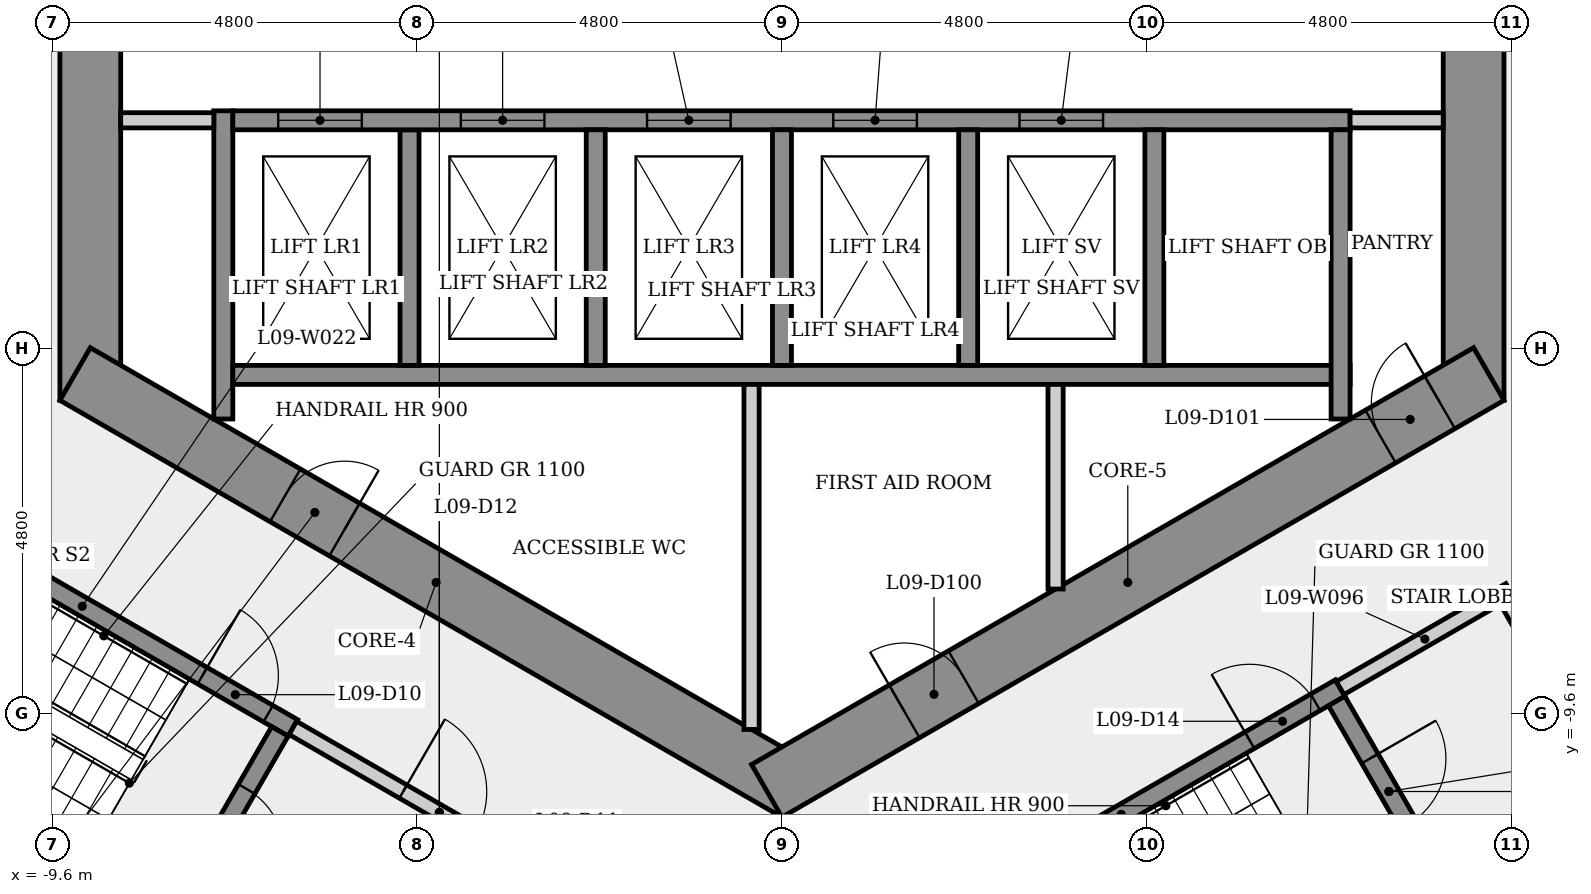
"""IFC4 building model, lengths in metres.
Left out: names, types, materials, properties, quantities, classifications, styles, units other than length and angle.
Written with IfcOpenShell. Run it as: python <this file> out.ifc"""

import sys

from ifc_helpers import new_model, si_unit, direction, frame, frame_2d, origin, place, context, subcontext, project, spatial, rectangle, extrude, element, fill, save


model = new_model("IFC4")
c1 = context("Model", 3, precision=1e-05, world=origin(), true_north=direction((0.0, 1.0)))
c2 = subcontext(c1, "Body", "Model", "MODEL_VIEW")
j1 = project(units=[si_unit("LENGTHUNIT", "METRE"), si_unit("PLANEANGLEUNIT", "RADIAN")], contexts=[c1])
p1 = place(None, origin())
s1 = spatial("IfcSite", under=j1, at=p1, CompositionType="ELEMENT")
p2 = place(p1, origin())
s2 = spatial("IfcBuilding", under=s1, at=p2, CompositionType="ELEMENT")
p3 = place(p2, frame((0.0, 0.0, 39.1)))
s3 = spatial("IfcBuildingStorey", under=s2, at=p3, CompositionType="ELEMENT", Elevation=39.1)
p4 = place(p3, frame((9.1, -5.485, 0.0), z_axis=(0.0, 0.0, 1.0), x_axis=(0.0, 1.0, 0.0)))
e1 = element("IfcWall", 1, at=p4, inside=s3, PredefinedType="SHEAR", context=c2, shape_type="SweptSolid", body=[
    extrude(rectangle(XDim=10.97, YDim=0.8, at=frame_2d((5.485, 0.0))), origin(), (0.0, 0.0, 1.0), 3.4),
])
p5 = place(p4, frame((4.685, 0.0, 0.0)))
e2 = element("IfcOpeningElement", 2, at=p5, cuts=e1, PredefinedType="OPENING", context=c2, shape_type="SweptSolid", body=[
    extrude(rectangle(XDim=1.6, YDim=2.1, at=frame_2d((0.8, 1.05))), frame((0.0, 0.41, 0.0), z_axis=(0.0, -1.0, 0.0), x_axis=(1.0, 0.0, 0.0)), (0.0, 0.0, 1.0), 0.82),
])
p6 = place(p3, frame((-9.1, 5.485, 0.0), z_axis=(0.0, 0.0, 1.0), x_axis=(0.0, -1.0, 0.0)))
e3 = element("IfcWall", 3, at=p6, inside=s3, PredefinedType="SHEAR", context=c2, shape_type="SweptSolid", body=[
    extrude(rectangle(XDim=10.97, YDim=0.8, at=frame_2d((5.485, 0.0))), origin(), (0.0, 0.0, 1.0), 3.4),
])
p7 = place(p6, frame((4.685, 0.0, 0.0)))
e4 = element("IfcOpeningElement", 4, at=p7, cuts=e3, PredefinedType="OPENING", context=c2, shape_type="SweptSolid", body=[
    extrude(rectangle(XDim=1.6, YDim=2.1, at=frame_2d((0.8, 1.05))), frame((0.0, 0.41, 0.0), z_axis=(0.0, -1.0, 0.0), x_axis=(1.0, 0.0, 0.0)), (0.0, 0.0, 1.0), 0.82),
])
p8 = place(p3, frame((-9.3, -5.138, 0.0), z_axis=(0.0, 0.0, 1.0), x_axis=(0.866023993627, -0.500002442456, 0.0)))
e5 = element("IfcWall", 5, at=p8, inside=s3, PredefinedType="SHEAR", context=c2, shape_type="SweptSolid", body=[
    extrude(rectangle(XDim=10.97, YDim=0.8, at=frame_2d((5.485, 0.0))), origin(), (0.0, 0.0, 1.0), 3.4),
])
p9 = place(p8, frame((3.192, 0.0, 0.0)))
e6 = element("IfcOpeningElement", 6, at=p9, cuts=e5, PredefinedType="OPENING", context=c2, shape_type="SweptSolid", body=[
    extrude(rectangle(XDim=0.9, YDim=2.1, at=frame_2d((0.45, 1.05))), frame((0.0, 0.41, 0.0), z_axis=(0.0, -1.0, 0.0), x_axis=(1.0, 0.0, 0.0)), (0.0, 0.0, 1.0), 0.82),
])
p10 = place(p3, frame((-0.2, -10.623, 0.0), z_axis=(0.0, 0.0, 1.0), x_axis=(0.866023993627, 0.500002442456, 0.0)))
e7 = element("IfcWall", 7, at=p10, inside=s3, PredefinedType="SHEAR", context=c2, shape_type="SweptSolid", body=[
    extrude(rectangle(XDim=10.97, YDim=0.8, at=frame_2d((5.485, 0.0))), origin(), (0.0, 0.0, 1.0), 3.4),
])
p11 = place(p10, frame((2.091, 0.0, 0.0)))
e8 = element("IfcOpeningElement", 8, at=p11, cuts=e7, PredefinedType="OPENING", context=c2, shape_type="SweptSolid", body=[
    extrude(rectangle(XDim=0.9, YDim=2.1, at=frame_2d((0.45, 1.05))), frame((0.0, 0.41, 0.0), z_axis=(0.0, -1.0, 0.0), x_axis=(1.0, 0.0, 0.0)), (0.0, 0.0, 1.0), 0.82),
])
p12 = place(p10, frame((9.325, 0.0, 0.0)))
e9 = element("IfcOpeningElement", 9, at=p12, cuts=e7, PredefinedType="OPENING", context=c2, shape_type="SweptSolid", body=[
    extrude(rectangle(XDim=0.9, YDim=2.1, at=frame_2d((0.45, 1.05))), frame((0.0, 0.41, 0.0), z_axis=(0.0, -1.0, 0.0), x_axis=(1.0, 0.0, 0.0)), (0.0, 0.0, 1.0), 0.82),
])
p13 = place(p3, frame((-11.977, -6.595, 0.0), z_axis=(0.0, 0.0, 1.0), x_axis=(0.866025499775, -0.499999833739, 0.0)))
e10 = element("IfcWall", 10, at=p13, inside=s3, PredefinedType="SHEAR", context=c2, shape_type="SweptSolid", body=[
    extrude(rectangle(XDim=6.4, YDim=0.25, at=frame_2d((3.2, 0.0))), origin(), (0.0, 0.0, 1.0), 3.05),
])
p14 = place(p13, frame((5.025, 0.0, 0.0)))
e11 = element("IfcOpeningElement", 11, at=p14, cuts=e10, PredefinedType="OPENING", context=c2, shape_type="SweptSolid", body=[
    extrude(rectangle(XDim=1.0, YDim=2.1, at=frame_2d((0.5, 1.05))), frame((0.0, 0.135, 0.0), z_axis=(0.0, -1.0, 0.0), x_axis=(1.0, 0.0, 0.0)), (0.0, 0.0, 1.0), 0.27),
])
p15 = place(p3, frame((-13.477, -9.193, 0.0), z_axis=(0.0, 0.0, 1.0), x_axis=(0.866025499775, -0.499999833739, 0.0)))
e12 = element("IfcWall", 12, at=p15, inside=s3, PredefinedType="SHEAR", context=c2, shape_type="SweptSolid", body=[
    extrude(rectangle(XDim=6.4, YDim=0.25, at=frame_2d((3.2, 0.0))), origin(), (0.0, 0.0, 1.0), 3.05),
])
p16 = place(p3, frame((-7.35, -5.73, 0.0), z_axis=(0.0, 0.0, 1.0), x_axis=(0.0, 1.0, 0.0)))
e13 = element("IfcWall", 13, at=p16, inside=s3, PredefinedType="SHEAR", context=c2, shape_type="SweptSolid", body=[
    extrude(rectangle(XDim=4.055, YDim=0.25, at=frame_2d((2.028, 0.0))), origin(), (0.0, 0.0, 1.0), 3.05),
])
p17 = place(p3, frame((-7.475, -1.8, 0.0), z_axis=(0.0, 0.0, 1.0), x_axis=(-1.0, 0.0, 0.0)))
e14 = element("IfcWall", 14, at=p17, inside=s3, PredefinedType="PARTITIONING", context=c2, shape_type="SweptSolid", body=[
    extrude(rectangle(XDim=1.225, YDim=0.2, at=frame_2d((0.613, 0.0))), origin(), (0.0, 0.0, 1.0), 3.05),
])
p18 = place(p3, frame((-6.605, -9.841, 0.0), z_axis=(0.0, 0.0, 1.0), x_axis=(-0.499996545922, -0.866027397988, 0.0)))
e15 = element("IfcWall", 15, at=p18, inside=s3, PredefinedType="SHEAR", context=c2, shape_type="SweptSolid", body=[
    extrude(rectangle(XDim=2.75, YDim=0.25, at=frame_2d((1.375, 0.0))), origin(), (0.0, 0.0, 1.0), 3.05),
])
p19 = place(p18, frame((0.875, 0.0, 0.0)))
e16 = element("IfcOpeningElement", 16, at=p19, cuts=e15, PredefinedType="OPENING", context=c2, shape_type="SweptSolid", body=[
    extrude(rectangle(XDim=1.0, YDim=2.1, at=frame_2d((0.5, 1.05))), frame((0.0, 0.135, 0.0), z_axis=(0.0, -1.0, 0.0), x_axis=(1.0, 0.0, 0.0)), (0.0, 0.0, 1.0), 0.27),
])
p20 = place(p3, frame((-6.435, -9.795, 0.0), z_axis=(0.0, 0.0, 1.0), x_axis=(0.866012907634, -0.500021643343, 0.0)))
e17 = element("IfcWall", 17, at=p20, inside=s3, PredefinedType="PARTITIONING", context=c2, shape_type="SweptSolid", body=[
    extrude(rectangle(XDim=4.45, YDim=0.2, at=frame_2d((2.225, 0.0))), origin(), (0.0, 0.0, 1.0), 3.05),
])
p21 = place(p20, frame((1.675, 0.0, 0.0)))
e18 = element("IfcOpeningElement", 18, at=p21, cuts=e17, PredefinedType="OPENING", context=c2, shape_type="SweptSolid", body=[
    extrude(rectangle(XDim=1.1, YDim=2.1, at=frame_2d((0.55, 1.05))), frame((0.0, 0.11, 0.0), z_axis=(0.0, -1.0, 0.0), x_axis=(1.0, 0.0, 0.0)), (0.0, 0.0, 1.0), 0.22),
])
p22 = place(p3, frame((-7.225, -5.15, 0.0), z_axis=(0.0, 0.0, 1.0), x_axis=(1.0, 0.0, 0.0)))
e19 = element("IfcWall", 19, at=p22, inside=s3, PredefinedType="SHEAR", context=c2, shape_type="SweptSolid", body=[
    extrude(rectangle(XDim=14.7, YDim=0.25, at=frame_2d((7.35, 0.0))), origin(), (0.0, 0.0, 1.0), 3.05),
])
p23 = place(p3, frame((-4.9, -1.925, 0.0), z_axis=(0.0, 0.0, 1.0), x_axis=(0.0, -1.0, 0.0)))
e20 = element("IfcWall", 20, at=p23, inside=s3, PredefinedType="SHEAR", context=c2, shape_type="SweptSolid", body=[
    extrude(rectangle(XDim=3.1, YDim=0.25, at=frame_2d((1.55, 0.0))), origin(), (0.0, 0.0, 1.0), 3.4),
])
p24 = place(p3, frame((-7.225, -1.8, 0.0), z_axis=(0.0, 0.0, 1.0), x_axis=(1.0, 0.0, 0.0)))
e21 = element("IfcWall", 21, at=p24, inside=s3, PredefinedType="SHEAR", context=c2, shape_type="SweptSolid", body=[
    extrude(rectangle(XDim=14.7, YDim=0.25, at=frame_2d((7.35, 0.0))), origin(), (0.0, 0.0, 1.0), 3.05),
])
p25 = place(p24, frame((0.597, 0.0, 0.0)))
e22 = element("IfcOpeningElement", 22, at=p25, cuts=e21, PredefinedType="OPENING", context=c2, shape_type="SweptSolid", body=[
    extrude(rectangle(XDim=1.1, YDim=2.1, at=frame_2d((0.55, 1.05))), frame((0.0, 0.135, 0.0), z_axis=(0.0, -1.0, 0.0), x_axis=(1.0, 0.0, 0.0)), (0.0, 0.0, 1.0), 0.27),
])
p26 = place(p24, frame((3.0, 0.0, 0.0)))
e23 = element("IfcOpeningElement", 23, at=p26, cuts=e21, PredefinedType="OPENING", context=c2, shape_type="SweptSolid", body=[
    extrude(rectangle(XDim=1.1, YDim=2.1, at=frame_2d((0.55, 1.05))), frame((0.0, 0.135, 0.0), z_axis=(0.0, -1.0, 0.0), x_axis=(1.0, 0.0, 0.0)), (0.0, 0.0, 1.0), 0.27),
])
p27 = place(p24, frame((5.45, 0.0, 0.0)))
e24 = element("IfcOpeningElement", 24, at=p27, cuts=e21, PredefinedType="OPENING", context=c2, shape_type="SweptSolid", body=[
    extrude(rectangle(XDim=1.1, YDim=2.1, at=frame_2d((0.55, 1.05))), frame((0.0, 0.135, 0.0), z_axis=(0.0, -1.0, 0.0), x_axis=(1.0, 0.0, 0.0)), (0.0, 0.0, 1.0), 0.27),
])
p28 = place(p24, frame((7.9, 0.0, 0.0)))
e25 = element("IfcOpeningElement", 25, at=p28, cuts=e21, PredefinedType="OPENING", context=c2, shape_type="SweptSolid", body=[
    extrude(rectangle(XDim=1.1, YDim=2.1, at=frame_2d((0.55, 1.05))), frame((0.0, 0.135, 0.0), z_axis=(0.0, -1.0, 0.0), x_axis=(1.0, 0.0, 0.0)), (0.0, 0.0, 1.0), 0.27),
])
p29 = place(p24, frame((10.35, 0.0, 0.0)))
e26 = element("IfcOpeningElement", 26, at=p29, cuts=e21, PredefinedType="OPENING", context=c2, shape_type="SweptSolid", body=[
    extrude(rectangle(XDim=1.1, YDim=2.1, at=frame_2d((0.55, 1.05))), frame((0.0, 0.135, 0.0), z_axis=(0.0, -1.0, 0.0), x_axis=(1.0, 0.0, 0.0)), (0.0, 0.0, 1.0), 0.27),
])
p30 = place(p3, frame((-2.45, -1.925, 0.0), z_axis=(0.0, 0.0, 1.0), x_axis=(0.0, -1.0, 0.0)))
e27 = element("IfcWall", 27, at=p30, inside=s3, PredefinedType="SHEAR", context=c2, shape_type="SweptSolid", body=[
    extrude(rectangle(XDim=3.1, YDim=0.25, at=frame_2d((1.55, 0.0))), origin(), (0.0, 0.0, 1.0), 3.4),
])
p31 = place(p3, frame((-0.4, -5.275, 0.0), z_axis=(0.0, 0.0, 1.0), x_axis=(0.0, -1.0, 0.0)))
e28 = element("IfcWall", 28, at=p31, inside=s3, PredefinedType="PARTITIONING", context=c2, shape_type="SweptSolid", body=[
    extrude(rectangle(XDim=4.54, YDim=0.2, at=frame_2d((2.27, 0.0))), origin(), (0.0, 0.0, 1.0), 3.05),
])
p32 = place(p3, frame((0.0, -1.925, 0.0), z_axis=(0.0, 0.0, 1.0), x_axis=(0.0, -1.0, 0.0)))
e29 = element("IfcWall", 29, at=p32, inside=s3, PredefinedType="SHEAR", context=c2, shape_type="SweptSolid", body=[
    extrude(rectangle(XDim=3.1, YDim=0.25, at=frame_2d((1.55, 0.0))), origin(), (0.0, 0.0, 1.0), 3.4),
])
p33 = place(p3, frame((1.585, -12.595, 0.0), z_axis=(0.0, 0.0, 1.0), x_axis=(0.866036417653, 0.499980922934, 0.0)))
e30 = element("IfcWall", 30, at=p33, inside=s3, PredefinedType="SHEAR", context=c2, shape_type="SweptSolid", body=[
    extrude(rectangle(XDim=6.65, YDim=0.25, at=frame_2d((3.325, 0.0))), origin(), (0.0, 0.0, 1.0), 3.05),
])
p34 = place(p33, frame((5.275, 0.0, 0.0)))
e31 = element("IfcOpeningElement", 31, at=p34, cuts=e30, PredefinedType="OPENING", context=c2, shape_type="SweptSolid", body=[
    extrude(rectangle(XDim=1.0, YDim=2.1, at=frame_2d((0.5, 1.05))), frame((0.0, 0.135, 0.0), z_axis=(0.0, -1.0, 0.0), x_axis=(1.0, 0.0, 0.0)), (0.0, 0.0, 1.0), 0.27),
])
p35 = place(p3, frame((2.45, -1.925, 0.0), z_axis=(0.0, 0.0, 1.0), x_axis=(0.0, -1.0, 0.0)))
e32 = element("IfcWall", 32, at=p35, inside=s3, PredefinedType="SHEAR", context=c2, shape_type="SweptSolid", body=[
    extrude(rectangle(XDim=3.1, YDim=0.25, at=frame_2d((1.55, 0.0))), origin(), (0.0, 0.0, 1.0), 3.4),
])
p36 = place(p3, frame((3.6, -5.275, 0.0), z_axis=(0.0, 0.0, 1.0), x_axis=(0.0, -1.0, 0.0)))
e33 = element("IfcWall", 33, at=p36, inside=s3, PredefinedType="PARTITIONING", context=c2, shape_type="SweptSolid", body=[
    extrude(rectangle(XDim=2.692, YDim=0.2, at=frame_2d((1.346, 0.0))), origin(), (0.0, 0.0, 1.0), 3.05),
])
p37 = place(p3, frame((4.9, -1.925, 0.0), z_axis=(0.0, 0.0, 1.0), x_axis=(0.0, -1.0, 0.0)))
e34 = element("IfcWall", 34, at=p37, inside=s3, PredefinedType="SHEAR", context=c2, shape_type="SweptSolid", body=[
    extrude(rectangle(XDim=3.1, YDim=0.25, at=frame_2d((1.55, 0.0))), origin(), (0.0, 0.0, 1.0), 3.4),
])
p38 = place(p3, frame((7.298, -9.441, 0.0), z_axis=(0.0, 0.0, 1.0), x_axis=(0.500034990121, -0.866005201286, 0.0)))
e35 = element("IfcWall", 35, at=p38, inside=s3, PredefinedType="SHEAR", context=c2, shape_type="SweptSolid", body=[
    extrude(rectangle(XDim=2.75, YDim=0.25, at=frame_2d((1.375, 0.0))), origin(), (0.0, 0.0, 1.0), 3.05),
])
p39 = place(p38, frame((0.875, 0.0, 0.0)))
e36 = element("IfcOpeningElement", 36, at=p39, cuts=e35, PredefinedType="OPENING", context=c2, shape_type="SweptSolid", body=[
    extrude(rectangle(XDim=1.0, YDim=2.1, at=frame_2d((0.5, 1.05))), frame((0.0, 0.135, 0.0), z_axis=(0.0, -1.0, 0.0), x_axis=(1.0, 0.0, 0.0)), (0.0, 0.0, 1.0), 0.27),
])
p40 = place(p3, frame((7.344, -9.27, 0.0), z_axis=(0.0, 0.0, 1.0), x_axis=(0.866005588531, 0.500034319456, 0.0)))
e37 = element("IfcWall", 37, at=p40, inside=s3, PredefinedType="PARTITIONING", context=c2, shape_type="SweptSolid", body=[
    extrude(rectangle(XDim=2.575, YDim=0.2, at=frame_2d((1.288, 0.0))), origin(), (0.0, 0.0, 1.0), 3.05),
])
p41 = place(p3, frame((7.35, -1.925, 0.0), z_axis=(0.0, 0.0, 1.0), x_axis=(0.0, -1.0, 0.0)))
e38 = element("IfcWall", 38, at=p41, inside=s3, PredefinedType="SHEAR", context=c2, shape_type="SweptSolid", body=[
    extrude(rectangle(XDim=3.805, YDim=0.25, at=frame_2d((1.903, 0.0))), origin(), (0.0, 0.0, 1.0), 3.05),
])
p42 = place(p3, frame((8.7, -1.8, 0.0), z_axis=(0.0, 0.0, 1.0), x_axis=(-1.0, 0.0, 0.0)))
e39 = element("IfcWall", 39, at=p42, inside=s3, PredefinedType="PARTITIONING", context=c2, shape_type="SweptSolid", body=[
    extrude(rectangle(XDim=1.225, YDim=0.2, at=frame_2d((0.613, 0.0))), origin(), (0.0, 0.0, 1.0), 3.05),
])
p43 = place(p3, frame((9.537, -8.119, 0.0), z_axis=(0.0, 0.0, 1.0), x_axis=(0.499990139034, -0.866031096941, 0.0)))
e40 = element("IfcWall", 40, at=p43, inside=s3, PredefinedType="PARTITIONING", context=c2, shape_type="SweptSolid", body=[
    extrude(rectangle(XDim=3.0, YDim=0.2, at=frame_2d((1.5, 0.0))), origin(), (0.0, 0.0, 1.0), 3.05),
])
p44 = place(p43, frame((0.935, 0.0, 0.0)))
e41 = element("IfcOpeningElement", 41, at=p44, cuts=e40, PredefinedType="OPENING", context=c2, shape_type="SweptSolid", body=[
    extrude(rectangle(XDim=1.0, YDim=2.1, at=frame_2d((0.5, 1.05))), frame((0.0, 0.11, 0.0), z_axis=(0.0, -1.0, 0.0), x_axis=(1.0, 0.0, 0.0)), (0.0, 0.0, 1.0), 0.22),
])
p45 = place(p3, frame((10.901, -10.681, 0.0), z_axis=(0.0, 0.0, 1.0), x_axis=(-0.866009402589, -0.500027713859, 0.0)))
e42 = element("IfcWall", 42, at=p45, inside=s3, PredefinedType="PARTITIONING", context=c2, shape_type="SweptSolid", body=[
    extrude(rectangle(XDim=2.1, YDim=0.2, at=frame_2d((1.05, 0.0))), origin(), (0.0, 0.0, 1.0), 3.05),
])
p46 = place(p25, origin())
e43 = element("IfcDoor", 43, at=p46, inside=s3, OperationType="SLIDING_TO_LEFT", PredefinedType="DOOR", context=c2, shape_type="SweptSolid", body=[
    extrude(rectangle(XDim=1.1, YDim=2.1, at=frame_2d((0.55, 1.05))), frame((0.0, 0.025, 0.0), z_axis=(0.0, -1.0, 0.0), x_axis=(1.0, 0.0, 0.0)), (0.0, 0.0, 1.0), 0.05),
])
fill(e22, e43)
p47 = place(p26, origin())
e44 = element("IfcDoor", 44, at=p47, inside=s3, OperationType="SLIDING_TO_LEFT", PredefinedType="DOOR", context=c2, shape_type="SweptSolid", body=[
    extrude(rectangle(XDim=1.1, YDim=2.1, at=frame_2d((0.55, 1.05))), frame((0.0, 0.025, 0.0), z_axis=(0.0, -1.0, 0.0), x_axis=(1.0, 0.0, 0.0)), (0.0, 0.0, 1.0), 0.05),
])
fill(e23, e44)
p48 = place(p27, origin())
e45 = element("IfcDoor", 45, at=p48, inside=s3, OperationType="SLIDING_TO_LEFT", PredefinedType="DOOR", context=c2, shape_type="SweptSolid", body=[
    extrude(rectangle(XDim=1.1, YDim=2.1, at=frame_2d((0.55, 1.05))), frame((0.0, 0.025, 0.0), z_axis=(0.0, -1.0, 0.0), x_axis=(1.0, 0.0, 0.0)), (0.0, 0.0, 1.0), 0.05),
])
fill(e24, e45)
p49 = place(p28, origin())
e46 = element("IfcDoor", 46, at=p49, inside=s3, OperationType="SLIDING_TO_LEFT", PredefinedType="DOOR", context=c2, shape_type="SweptSolid", body=[
    extrude(rectangle(XDim=1.1, YDim=2.1, at=frame_2d((0.55, 1.05))), frame((0.0, 0.025, 0.0), z_axis=(0.0, -1.0, 0.0), x_axis=(1.0, 0.0, 0.0)), (0.0, 0.0, 1.0), 0.05),
])
fill(e25, e46)
p50 = place(p29, origin())
e47 = element("IfcDoor", 47, at=p50, inside=s3, OperationType="SLIDING_TO_LEFT", PredefinedType="DOOR", context=c2, shape_type="SweptSolid", body=[
    extrude(rectangle(XDim=1.1, YDim=2.1, at=frame_2d((0.55, 1.05))), frame((0.0, 0.025, 0.0), z_axis=(0.0, -1.0, 0.0), x_axis=(1.0, 0.0, 0.0)), (0.0, 0.0, 1.0), 0.05),
])
fill(e26, e47)
p51 = place(p14, origin())
e48 = element("IfcDoor", 48, at=p51, inside=s3, OperationType="SINGLE_SWING_LEFT", PredefinedType="DOOR", context=c2, shape_type="SweptSolid", body=[
    extrude(rectangle(XDim=1.0, YDim=2.1, at=frame_2d((0.5, 1.05))), frame((0.0, 0.025, 0.0), z_axis=(0.0, -1.0, 0.0), x_axis=(1.0, 0.0, 0.0)), (0.0, 0.0, 1.0), 0.05),
])
fill(e11, e48)
p52 = place(p19, origin())
e49 = element("IfcDoor", 49, at=p52, inside=s3, OperationType="SINGLE_SWING_RIGHT", PredefinedType="DOOR", context=c2, shape_type="SweptSolid", body=[
    extrude(rectangle(XDim=1.0, YDim=2.1, at=frame_2d((0.5, 1.05))), frame((0.0, 0.025, 0.0), z_axis=(0.0, -1.0, 0.0), x_axis=(1.0, 0.0, 0.0)), (0.0, 0.0, 1.0), 0.05),
])
fill(e16, e49)
p53 = place(p21, origin())
e50 = element("IfcDoor", 50, at=p53, inside=s3, OperationType="SINGLE_SWING_LEFT", PredefinedType="DOOR", context=c2, shape_type="SweptSolid", body=[
    extrude(rectangle(XDim=1.1, YDim=2.1, at=frame_2d((0.55, 1.05))), frame((0.0, 0.025, 0.0), z_axis=(0.0, -1.0, 0.0), x_axis=(1.0, 0.0, 0.0)), (0.0, 0.0, 1.0), 0.05),
])
fill(e18, e50)
p54 = place(p34, origin())
e51 = element("IfcDoor", 51, at=p54, inside=s3, OperationType="SINGLE_SWING_LEFT", PredefinedType="DOOR", context=c2, shape_type="SweptSolid", body=[
    extrude(rectangle(XDim=1.0, YDim=2.1, at=frame_2d((0.5, 1.05))), frame((0.0, 0.025, 0.0), z_axis=(0.0, -1.0, 0.0), x_axis=(1.0, 0.0, 0.0)), (0.0, 0.0, 1.0), 0.05),
])
fill(e31, e51)
p55 = place(p39, origin())
e52 = element("IfcDoor", 52, at=p55, inside=s3, OperationType="SINGLE_SWING_LEFT", PredefinedType="DOOR", context=c2, shape_type="SweptSolid", body=[
    extrude(rectangle(XDim=1.0, YDim=2.1, at=frame_2d((0.5, 1.05))), frame((0.0, 0.025, 0.0), z_axis=(0.0, -1.0, 0.0), x_axis=(1.0, 0.0, 0.0)), (0.0, 0.0, 1.0), 0.05),
])
fill(e36, e52)
p56 = place(p9, origin())
e53 = element("IfcDoor", 53, at=p56, inside=s3, OperationType="SINGLE_SWING_RIGHT", PredefinedType="DOOR", context=c2, shape_type="SweptSolid", body=[
    extrude(rectangle(XDim=0.9, YDim=2.1, at=frame_2d((0.45, 1.05))), frame((0.0, 0.025, 0.0), z_axis=(0.0, -1.0, 0.0), x_axis=(1.0, 0.0, 0.0)), (0.0, 0.0, 1.0), 0.05),
])
fill(e6, e53)
p57 = place(p11, origin())
e54 = element("IfcDoor", 54, at=p57, inside=s3, OperationType="SINGLE_SWING_LEFT", PredefinedType="DOOR", context=c2, shape_type="SweptSolid", body=[
    extrude(rectangle(XDim=0.9, YDim=2.1, at=frame_2d((0.45, 1.05))), frame((0.0, 0.025, 0.0), z_axis=(0.0, -1.0, 0.0), x_axis=(1.0, 0.0, 0.0)), (0.0, 0.0, 1.0), 0.05),
])
fill(e8, e54)
p58 = place(p12, origin())
e55 = element("IfcDoor", 55, at=p58, inside=s3, OperationType="SINGLE_SWING_RIGHT", PredefinedType="DOOR", context=c2, shape_type="SweptSolid", body=[
    extrude(rectangle(XDim=0.9, YDim=2.1, at=frame_2d((0.45, 1.05))), frame((0.0, 0.025, 0.0), z_axis=(0.0, -1.0, 0.0), x_axis=(1.0, 0.0, 0.0)), (0.0, 0.0, 1.0), 0.05),
])
fill(e9, e55)
save(model, sys.argv[1])
